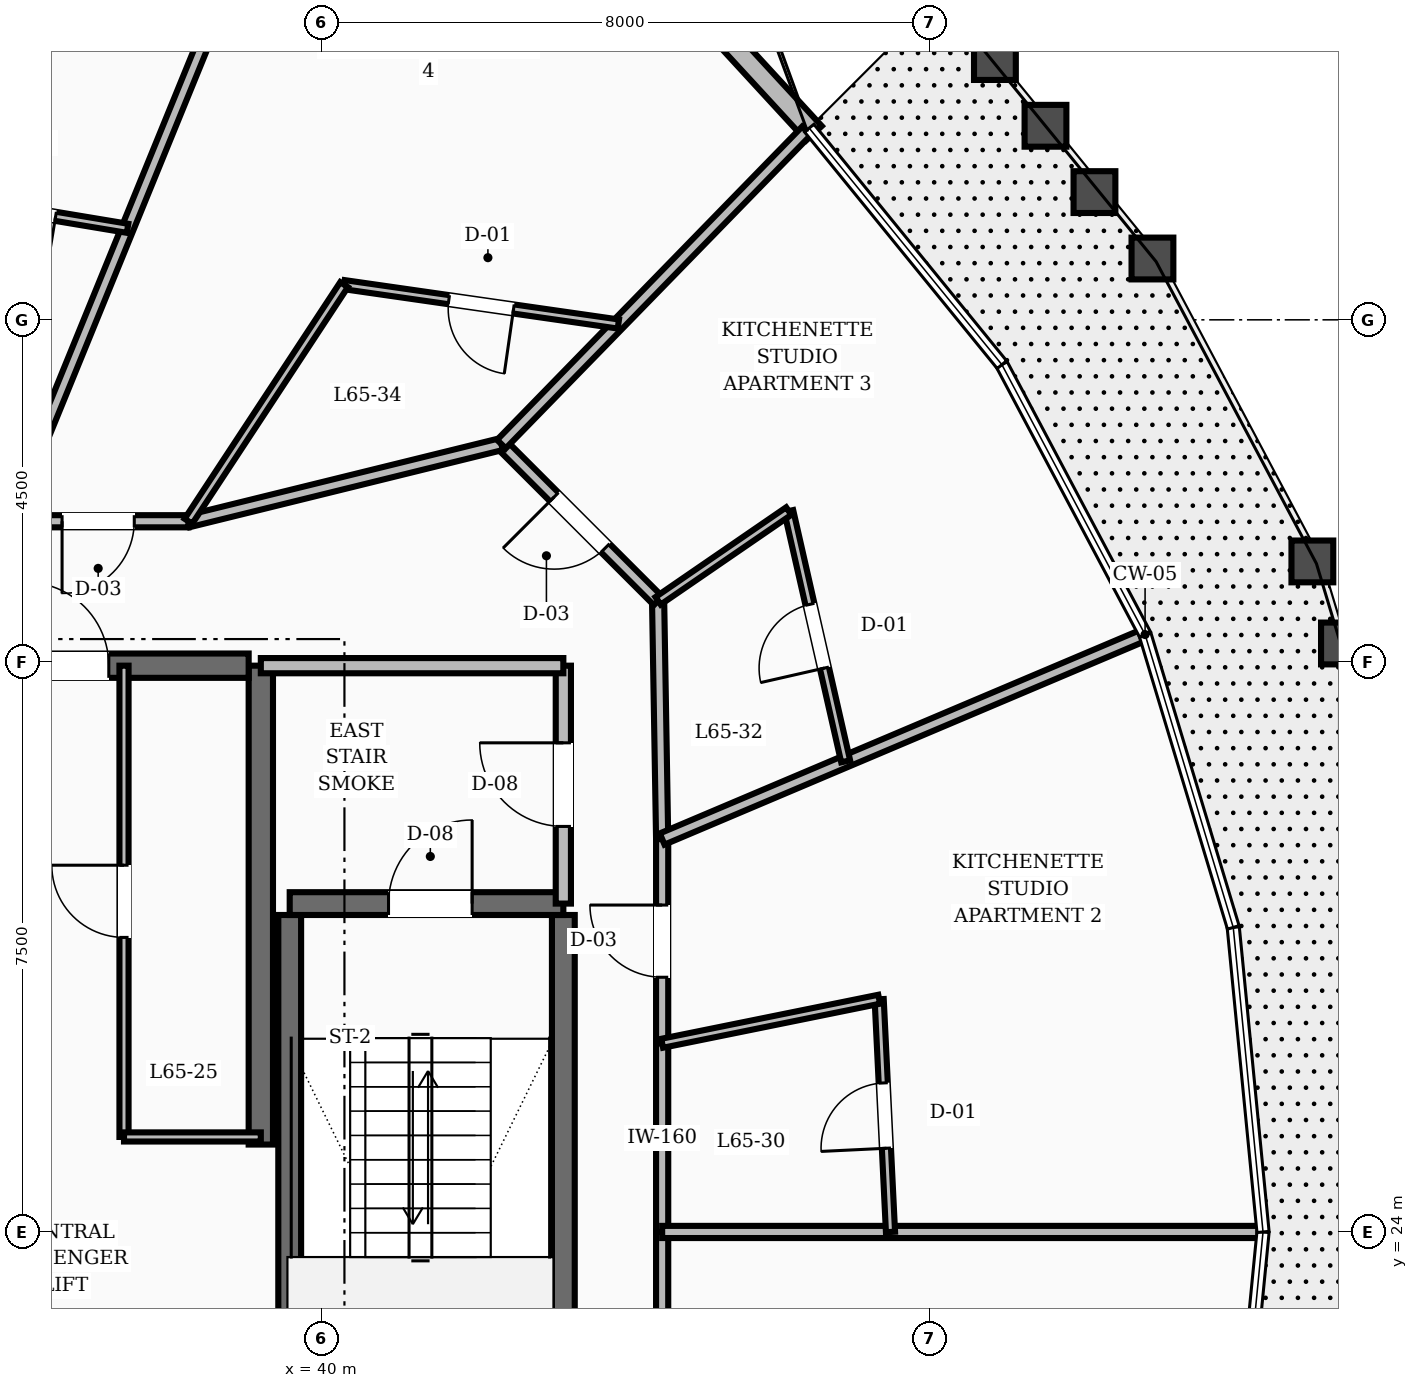
"""IFC4 building model, lengths in metres.
Left out: names, types, materials, properties, quantities, classifications, styles, units other than length and angle.
Written with IfcOpenShell. Run it as: python <this file> out.ifc"""

import sys

from ifc_helpers import new_model, si_unit, direction, frame, frame_2d, origin, place, context, subcontext, project, spatial, rectangle, extrude, element, fill, save


model = new_model("IFC4")
c1 = context("Model", 3, precision=1e-05, world=origin(), true_north=direction((0.0, 1.0)))
c2 = subcontext(c1, "Body", "Model", "MODEL_VIEW")
j1 = project(units=[si_unit("LENGTHUNIT", "METRE"), si_unit("PLANEANGLEUNIT", "RADIAN")], contexts=[c1])
p1 = place(None, origin())
s1 = spatial("IfcSite", under=j1, at=p1, CompositionType="ELEMENT")
p2 = place(p1, origin())
s2 = spatial("IfcBuilding", under=s1, at=p2, CompositionType="ELEMENT")
p3 = place(p2, frame((0.0, 0.0, 250.8)))
s3 = spatial("IfcBuildingStorey", under=s2, at=p3, CompositionType="ELEMENT", Elevation=250.8)
p4 = place(p3, frame((39.2, 25.15, 0.0), z_axis=(0.0, 0.0, 1.0), x_axis=(0.0, 1.0, 0.0)))
e1 = element("IfcWall", 1, at=p4, inside=s3, PredefinedType="SHEAR", context=c2, shape_type="SweptSolid", body=[
    extrude(rectangle(XDim=6.3, YDim=0.32, at=frame_2d((3.15, 0.0))), origin(), (0.0, 0.0, 1.0), 3.6),
])
p5 = place(p3, frame((35.8, 31.45, 0.0), z_axis=(0.0, 0.0, 1.0), x_axis=(1.0, 0.0, 0.0)))
e2 = element("IfcWall", 2, at=p5, inside=s3, PredefinedType="SHEAR", context=c2, shape_type="SweptSolid", body=[
    extrude(rectangle(XDim=3.24, YDim=0.32, at=frame_2d((1.62, 0.0))), origin(), (0.0, 0.0, 1.0), 3.6),
])
p6 = place(p5, frame((0.3, 0.0, 0.0)))
e3 = element("IfcOpeningElement", 3, at=p6, cuts=e2, PredefinedType="OPENING", context=c2, shape_type="SweptSolid", body=[
    extrude(rectangle(XDim=1.1, YDim=2.1, at=frame_2d((0.55, 1.05))), frame((0.0, 0.17, 0.0), z_axis=(0.0, -1.0, 0.0), x_axis=(1.0, 0.0, 0.0)), (0.0, 0.0, 1.0), 0.34),
])
for number, where, z_axis, x_axis in (
    (4, (43.18, 19.43, 0.0), (0.0, 0.0, 1.0), (0.0, 1.0, 0.0)),
    (5, (39.58, 19.43, 0.0), (0.0, 0.0, 1.0), (0.0, 1.0, 0.0)),
):
    element("IfcWall", number, at=place(p3, frame(where, z_axis=z_axis, x_axis=x_axis)), inside=s3, PredefinedType="SHEAR", context=c2, shape_type="SweptSolid", body=[
        extrude(rectangle(XDim=8.74, YDim=0.3, at=frame_2d((4.37, 0.0))), origin(), (0.0, 0.0, 1.0), 3.6),
    ])
p7 = place(p3, frame((39.58, 28.32, 0.0), z_axis=(0.0, 0.0, 1.0), x_axis=(1.0, 0.0, 0.0)))
e6 = element("IfcWall", 6, at=p7, inside=s3, PredefinedType="SHEAR", context=c2, shape_type="SweptSolid", body=[
    extrude(rectangle(XDim=3.6, YDim=0.3, at=frame_2d((1.8, 0.0))), origin(), (0.0, 0.0, 1.0), 3.6),
])
p8 = place(p7, frame((1.3, 0.0, 0.0)))
e7 = element("IfcOpeningElement", 7, at=p8, cuts=e6, PredefinedType="OPENING", context=c2, shape_type="SweptSolid", body=[
    extrude(rectangle(XDim=1.1, YDim=2.1, at=frame_2d((0.55, 1.05))), frame((0.0, 0.16, 0.0), z_axis=(0.0, -1.0, 0.0), x_axis=(1.0, 0.0, 0.0)), (0.0, 0.0, 1.0), 0.32),
])
p9 = place(p3, frame((46.477, 38.455, 0.0), z_axis=(0.0, 0.0, 1.0), x_axis=(-0.677046444882, 0.735940290698, 0.0)))
e8 = element("IfcWall", 8, at=p9, inside=s3, PredefinedType="STANDARD", context=c2, shape_type="SweptSolid", body=[
    extrude(rectangle(XDim=4.195, YDim=0.28, at=frame_2d((2.098, 0.0))), origin(), (0.0, 0.0, 1.0), 2.88),
])
p10 = place(p3, frame((43.18, 28.32, 0.0), z_axis=(0.0, 0.0, 1.0), x_axis=(0.0, 1.0, 0.0)))
e9 = element("IfcWall", 9, at=p10, inside=s3, PredefinedType="SOLIDWALL", context=c2, shape_type="SweptSolid", body=[
    extrude(rectangle(XDim=3.13, YDim=0.2, at=frame_2d((1.565, 0.0))), origin(), (0.0, 0.0, 1.0), 2.87),
])
p11 = place(p10, frame((1.015, 0.0, 0.0)))
e10 = element("IfcOpeningElement", 10, at=p11, cuts=e9, PredefinedType="OPENING", context=c2, shape_type="SweptSolid", body=[
    extrude(rectangle(XDim=1.1, YDim=2.1, at=frame_2d((0.55, 1.05))), frame((0.0, 0.11, 0.0), z_axis=(0.0, -1.0, 0.0), x_axis=(1.0, 0.0, 0.0)), (0.0, 0.0, 1.0), 0.22),
])
p12 = place(p3, frame((39.2, 31.45, 0.0), z_axis=(0.0, 0.0, 1.0), x_axis=(1.0, 0.0, 0.0)))
e11 = element("IfcWall", 11, at=p12, inside=s3, PredefinedType="SOLIDWALL", context=c2, shape_type="SweptSolid", body=[
    extrude(rectangle(XDim=3.98, YDim=0.2, at=frame_2d((1.99, 0.0))), origin(), (0.0, 0.0, 1.0), 2.87),
])
p13 = place(p3, frame((37.4, 25.25, 0.0), z_axis=(0.0, 0.0, 1.0), x_axis=(0.0, 1.0, 0.0)))
e12 = element("IfcWall", 12, at=p13, inside=s3, PredefinedType="PARTITIONING", context=c2, shape_type="SweptSolid", body=[
    extrude(rectangle(XDim=6.2, YDim=0.12, at=frame_2d((3.1, 0.0))), origin(), (0.0, 0.0, 1.0), 2.87),
])
p14 = place(p13, frame((2.625, 0.0, 0.0)))
e13 = element("IfcOpeningElement", 13, at=p14, cuts=e12, PredefinedType="OPENING", context=c2, shape_type="SweptSolid", body=[
    extrude(rectangle(XDim=0.95, YDim=2.1, at=frame_2d((0.475, 1.05))), frame((0.0, 0.07, 0.0), z_axis=(0.0, -1.0, 0.0), x_axis=(1.0, 0.0, 0.0)), (0.0, 0.0, 1.0), 0.14),
])
p15 = place(p3, frame((37.4, 25.25, 0.0), z_axis=(0.0, 0.0, 1.0), x_axis=(1.0, 0.0, 0.0)))
e14 = element("IfcWall", 14, at=p15, inside=s3, PredefinedType="PARTITIONING", context=c2, shape_type="SweptSolid", body=[
    extrude(rectangle(XDim=1.8, YDim=0.12, at=frame_2d((0.9, 0.0))), origin(), (0.0, 0.0, 1.0), 2.87),
])
p16 = place(p3, frame((44.48, 24.0, 0.0), z_axis=(0.0, 0.0, 1.0), x_axis=(0.0, 1.0, 0.0)))
e15 = element("IfcWall", 15, at=p16, inside=s3, PredefinedType="SOLIDWALL", context=c2, shape_type="SweptSolid", body=[
    extrude(rectangle(XDim=2.482, YDim=0.16, at=frame_2d((1.241, 0.0))), origin(), (0.0, 0.0, 1.0), 2.87),
])
p17 = place(p3, frame((44.48, 26.482, 0.0), z_axis=(0.0, 0.0, 1.0), x_axis=(0.0, 1.0, 0.0)))
e16 = element("IfcWall", 16, at=p17, inside=s3, PredefinedType="SOLIDWALL", context=c2, shape_type="SweptSolid", body=[
    extrude(rectangle(XDim=2.687, YDim=0.16, at=frame_2d((1.344, 0.0))), origin(), (0.0, 0.0, 1.0), 2.87),
])
p18 = place(p17, frame((0.868, 0.0, 0.0)))
e17 = element("IfcOpeningElement", 17, at=p18, cuts=e16, PredefinedType="OPENING", context=c2, shape_type="SweptSolid", body=[
    extrude(rectangle(XDim=0.95, YDim=2.1, at=frame_2d((0.475, 1.05))), frame((0.0, 0.09, 0.0), z_axis=(0.0, -1.0, 0.0), x_axis=(1.0, 0.0, 0.0)), (0.0, 0.0, 1.0), 0.18),
])
p19 = place(p3, frame((44.48, 29.169, 0.0), z_axis=(0.0, 0.0, 1.0), x_axis=(-0.016981035134, 0.999855811828, 0.0)))
e18 = element("IfcWall", 18, at=p19, inside=s3, PredefinedType="SOLIDWALL", context=c2, shape_type="SweptSolid", body=[
    extrude(rectangle(XDim=3.134, YDim=0.16, at=frame_2d((1.567, 0.0))), origin(), (0.0, 0.0, 1.0), 2.87),
])
p20 = place(p3, frame((44.427, 32.303, 0.0), z_axis=(0.0, 0.0, 1.0), x_axis=(-0.707106781187, 0.707106781187, 0.0)))
e19 = element("IfcWall", 19, at=p20, inside=s3, PredefinedType="SOLIDWALL", context=c2, shape_type="SweptSolid", body=[
    extrude(rectangle(XDim=2.916, YDim=0.16, at=frame_2d((1.458, 0.0))), origin(), (0.0, 0.0, 1.0), 2.87),
])
p21 = place(p20, frame((0.983, 0.0, 0.0)))
e20 = element("IfcOpeningElement", 20, at=p21, cuts=e19, PredefinedType="OPENING", context=c2, shape_type="SweptSolid", body=[
    extrude(rectangle(XDim=0.95, YDim=2.1, at=frame_2d((0.475, 1.05))), frame((0.0, 0.09, 0.0), z_axis=(0.0, -1.0, 0.0), x_axis=(1.0, 0.0, 0.0)), (0.0, 0.0, 1.0), 0.18),
])
p22 = place(p3, frame((42.365, 34.365, 0.0), z_axis=(0.0, 0.0, 1.0), x_axis=(-0.970939799552, -0.239323850978, 0.0)))
e21 = element("IfcWall", 21, at=p22, inside=s3, PredefinedType="SOLIDWALL", context=c2, shape_type="SweptSolid", body=[
    extrude(rectangle(XDim=4.241, YDim=0.16, at=frame_2d((2.12, 0.0))), origin(), (0.0, 0.0, 1.0), 2.87),
])
p23 = place(p3, frame((38.248, 33.35, 0.0), z_axis=(0.0, 0.0, 1.0), x_axis=(-1.0, 0.0, 0.0)))
e22 = element("IfcWall", 22, at=p23, inside=s3, PredefinedType="SOLIDWALL", context=c2, shape_type="SweptSolid", body=[
    extrude(rectangle(XDim=2.375, YDim=0.16, at=frame_2d((1.188, 0.0))), origin(), (0.0, 0.0, 1.0), 2.87),
])
p24 = place(p23, frame((0.712, 0.0, 0.0)))
e23 = element("IfcOpeningElement", 23, at=p24, cuts=e22, PredefinedType="OPENING", context=c2, shape_type="SweptSolid", body=[
    extrude(rectangle(XDim=0.95, YDim=2.1, at=frame_2d((0.475, 1.05))), frame((0.0, 0.09, 0.0), z_axis=(0.0, -1.0, 0.0), x_axis=(1.0, 0.0, 0.0)), (0.0, 0.0, 1.0), 0.18),
])
p25 = place(p3, frame((44.48, 21.518, 0.0), z_axis=(0.0, 0.0, 1.0), x_axis=(0.0, 1.0, 0.0)))
e24 = element("IfcWall", 24, at=p25, inside=s3, PredefinedType="SOLIDWALL", context=c2, shape_type="SweptSolid", body=[
    extrude(rectangle(XDim=2.482, YDim=0.16, at=frame_2d((1.241, 0.0))), origin(), (0.0, 0.0, 1.0), 2.87),
])
p26 = place(p3, frame((44.48, 24.0, 0.0), z_axis=(0.0, 0.0, 1.0), x_axis=(1.0, 0.0, 0.0)))
e25 = element("IfcWall", 25, at=p26, inside=s3, PredefinedType="SOLIDWALL", context=c2, shape_type="SweptSolid", body=[
    extrude(rectangle(XDim=7.855, YDim=0.16, at=frame_2d((3.928, 0.0))), origin(), (0.0, 0.0, 1.0), 2.87),
])
p27 = place(p3, frame((47.484, 24.0, 0.0), z_axis=(0.0, 0.0, 1.0), x_axis=(-0.048507424132, 0.998822822028, 0.0)))
e26 = element("IfcWall", 26, at=p27, inside=s3, PredefinedType="PARTITIONING", context=c2, shape_type="SweptSolid", body=[
    extrude(rectangle(XDim=3.065, YDim=0.12, at=frame_2d((1.533, 0.0))), origin(), (0.0, 0.0, 1.0), 2.87),
])
p28 = place(p27, frame((1.103, 0.0, 0.0)))
e27 = element("IfcOpeningElement", 27, at=p28, cuts=e26, PredefinedType="OPENING", context=c2, shape_type="SweptSolid", body=[
    extrude(rectangle(XDim=0.86, YDim=2.1, at=frame_2d((0.43, 1.05))), frame((0.0, 0.07, 0.0), z_axis=(0.0, -1.0, 0.0), x_axis=(1.0, 0.0, 0.0)), (0.0, 0.0, 1.0), 0.14),
])
p29 = place(p3, frame((44.48, 26.482, 0.0), z_axis=(0.0, 0.0, 1.0), x_axis=(0.980045260394, 0.198774464101, 0.0)))
e28 = element("IfcWall", 28, at=p29, inside=s3, PredefinedType="PARTITIONING", context=c2, shape_type="SweptSolid", body=[
    extrude(rectangle(XDim=2.913, YDim=0.12, at=frame_2d((1.457, 0.0))), origin(), (0.0, 0.0, 1.0), 2.87),
])
p30 = place(p3, frame((44.48, 29.169, 0.0), z_axis=(0.0, 0.0, 1.0), x_axis=(0.920872772273, 0.389863228949, 0.0)))
e29 = element("IfcWall", 29, at=p30, inside=s3, PredefinedType="SOLIDWALL", context=c2, shape_type="SweptSolid", body=[
    extrude(rectangle(XDim=6.85, YDim=0.16, at=frame_2d((3.425, 0.0))), origin(), (0.0, 0.0, 1.0), 2.87),
])
p31 = place(p3, frame((46.894, 30.192, 0.0), z_axis=(0.0, 0.0, 1.0), x_axis=(-0.221774244265, 0.975098038446, 0.0)))
e30 = element("IfcWall", 30, at=p31, inside=s3, PredefinedType="PARTITIONING", context=c2, shape_type="SweptSolid", body=[
    extrude(rectangle(XDim=3.376, YDim=0.12, at=frame_2d((1.688, 0.0))), origin(), (0.0, 0.0, 1.0), 2.87),
])
p32 = place(p31, frame((1.258, 0.0, 0.0)))
e31 = element("IfcOpeningElement", 31, at=p32, cuts=e30, PredefinedType="OPENING", context=c2, shape_type="SweptSolid", body=[
    extrude(rectangle(XDim=0.86, YDim=2.1, at=frame_2d((0.43, 1.05))), frame((0.0, 0.07, 0.0), z_axis=(0.0, -1.0, 0.0), x_axis=(1.0, 0.0, 0.0)), (0.0, 0.0, 1.0), 0.14),
])
p33 = place(p3, frame((44.427, 32.303, 0.0), z_axis=(0.0, 0.0, 1.0), x_axis=(0.824260499572, 0.566210763626, 0.0)))
e32 = element("IfcWall", 32, at=p33, inside=s3, PredefinedType="PARTITIONING", context=c2, shape_type="SweptSolid", body=[
    extrude(rectangle(XDim=2.085, YDim=0.12, at=frame_2d((1.042, 0.0))), origin(), (0.0, 0.0, 1.0), 2.87),
])
p34 = place(p3, frame((42.365, 34.365, 0.0), z_axis=(0.0, 0.0, 1.0), x_axis=(0.697753092732, 0.716338342952, 0.0)))
e33 = element("IfcWall", 33, at=p34, inside=s3, PredefinedType="SOLIDWALL", context=c2, shape_type="SweptSolid", body=[
    extrude(rectangle(XDim=5.754, YDim=0.16, at=frame_2d((2.877, 0.0))), origin(), (0.0, 0.0, 1.0), 2.87),
])
p35 = place(p3, frame((43.904, 35.945, 0.0), z_axis=(0.0, 0.0, 1.0), x_axis=(-0.989850131558, 0.142115154206, 0.0)))
e34 = element("IfcWall", 34, at=p35, inside=s3, PredefinedType="PARTITIONING", context=c2, shape_type="SweptSolid", body=[
    extrude(rectangle(XDim=3.646, YDim=0.12, at=frame_2d((1.823, 0.0))), origin(), (0.0, 0.0, 1.0), 2.87),
])
p36 = place(p35, frame((1.393, 0.0, 0.0)))
e35 = element("IfcOpeningElement", 35, at=p36, cuts=e34, PredefinedType="OPENING", context=c2, shape_type="SweptSolid", body=[
    extrude(rectangle(XDim=0.86, YDim=2.1, at=frame_2d((0.43, 1.05))), frame((0.0, 0.07, 0.0), z_axis=(0.0, -1.0, 0.0), x_axis=(1.0, 0.0, 0.0)), (0.0, 0.0, 1.0), 0.14),
])
p37 = place(p3, frame((38.248, 33.35, 0.0), z_axis=(0.0, 0.0, 1.0), x_axis=(0.549609280911, 0.835421832571, 0.0)))
e36 = element("IfcWall", 36, at=p37, inside=s3, PredefinedType="PARTITIONING", context=c2, shape_type="SweptSolid", body=[
    extrude(rectangle(XDim=3.726, YDim=0.12, at=frame_2d((1.863, 0.0))), origin(), (0.0, 0.0, 1.0), 2.87),
])
p38 = place(p3, frame((35.873, 33.35, 0.0), z_axis=(0.0, 0.0, 1.0), x_axis=(0.378155079747, 0.925742262005, 0.0)))
e37 = element("IfcWall", 37, at=p38, inside=s3, PredefinedType="SOLIDWALL", context=c2, shape_type="SweptSolid", body=[
    extrude(rectangle(XDim=10.905, YDim=0.16, at=frame_2d((5.453, 0.0))), origin(), (0.0, 0.0, 1.0), 2.87),
])
p39 = place(p3, frame((37.447, 37.204, 0.0), z_axis=(0.0, 0.0, 1.0), x_axis=(-0.986441372128, 0.164114043742, 0.0)))
e38 = element("IfcWall", 38, at=p39, inside=s3, PredefinedType="PARTITIONING", context=c2, shape_type="SweptSolid", body=[
    extrude(rectangle(XDim=2.779, YDim=0.12, at=frame_2d((1.389, 0.0))), origin(), (0.0, 0.0, 1.0), 2.87),
])
p40 = place(p39, frame((0.959, 0.0, 0.0)))
e39 = element("IfcOpeningElement", 39, at=p40, cuts=e38, PredefinedType="OPENING", context=c2, shape_type="SweptSolid", body=[
    extrude(rectangle(XDim=0.86, YDim=2.1, at=frame_2d((0.43, 1.05))), frame((0.0, 0.07, 0.0), z_axis=(0.0, -1.0, 0.0), x_axis=(1.0, 0.0, 0.0)), (0.0, 0.0, 1.0), 0.14),
])
p41 = place(p8, origin())
e40 = element("IfcDoor", 40, at=p41, inside=s3, OperationType="SINGLE_SWING_RIGHT", PredefinedType="DOOR", context=c2, shape_type="SweptSolid", body=[
    extrude(rectangle(XDim=1.1, YDim=2.1, at=frame_2d((0.55, 1.05))), frame((0.0, 0.025, 0.0), z_axis=(0.0, -1.0, 0.0), x_axis=(1.0, 0.0, 0.0)), (0.0, 0.0, 1.0), 0.05),
])
fill(e7, e40)
p42 = place(p11, origin())
e41 = element("IfcDoor", 41, at=p42, inside=s3, OperationType="SINGLE_SWING_RIGHT", PredefinedType="DOOR", context=c2, shape_type="SweptSolid", body=[
    extrude(rectangle(XDim=1.1, YDim=2.1, at=frame_2d((0.55, 1.05))), frame((0.0, 0.025, 0.0), z_axis=(0.0, -1.0, 0.0), x_axis=(1.0, 0.0, 0.0)), (0.0, 0.0, 1.0), 0.05),
])
fill(e10, e41)
p43 = place(p6, origin())
e42 = element("IfcDoor", 42, at=p43, inside=s3, OperationType="SINGLE_SWING_LEFT", PredefinedType="DOOR", context=c2, shape_type="SweptSolid", body=[
    extrude(rectangle(XDim=1.1, YDim=2.1, at=frame_2d((0.55, 1.05))), frame((0.0, 0.025, 0.0), z_axis=(0.0, -1.0, 0.0), x_axis=(1.0, 0.0, 0.0)), (0.0, 0.0, 1.0), 0.05),
])
fill(e3, e42)
p44 = place(p14, origin())
e43 = element("IfcDoor", 43, at=p44, inside=s3, OperationType="SINGLE_SWING_RIGHT", PredefinedType="DOOR", context=c2, shape_type="SweptSolid", body=[
    extrude(rectangle(XDim=0.95, YDim=2.1, at=frame_2d((0.475, 1.05))), frame((0.0, 0.025, 0.0), z_axis=(0.0, -1.0, 0.0), x_axis=(1.0, 0.0, 0.0)), (0.0, 0.0, 1.0), 0.05),
])
fill(e13, e43)
p45 = place(p28, origin())
e44 = element("IfcDoor", 44, at=p45, inside=s3, OperationType="SINGLE_SWING_LEFT", PredefinedType="DOOR", context=c2, shape_type="SweptSolid", body=[
    extrude(rectangle(XDim=0.86, YDim=2.1, at=frame_2d((0.43, 1.05))), frame((0.0, 0.025, 0.0), z_axis=(0.0, -1.0, 0.0), x_axis=(1.0, 0.0, 0.0)), (0.0, 0.0, 1.0), 0.05),
])
fill(e27, e44)
p46 = place(p18, origin())
e45 = element("IfcDoor", 45, at=p46, inside=s3, OperationType="SINGLE_SWING_RIGHT", PredefinedType="DOOR", context=c2, shape_type="SweptSolid", body=[
    extrude(rectangle(XDim=0.95, YDim=2.1, at=frame_2d((0.475, 1.05))), frame((0.0, 0.025, 0.0), z_axis=(0.0, -1.0, 0.0), x_axis=(1.0, 0.0, 0.0)), (0.0, 0.0, 1.0), 0.05),
])
fill(e17, e45)
p47 = place(p32, origin())
e46 = element("IfcDoor", 46, at=p47, inside=s3, OperationType="SINGLE_SWING_LEFT", PredefinedType="DOOR", context=c2, shape_type="SweptSolid", body=[
    extrude(rectangle(XDim=0.86, YDim=2.1, at=frame_2d((0.43, 1.05))), frame((0.0, 0.025, 0.0), z_axis=(0.0, -1.0, 0.0), x_axis=(1.0, 0.0, 0.0)), (0.0, 0.0, 1.0), 0.05),
])
fill(e31, e46)
p48 = place(p21, origin())
e47 = element("IfcDoor", 47, at=p48, inside=s3, OperationType="SINGLE_SWING_RIGHT", PredefinedType="DOOR", context=c2, shape_type="SweptSolid", body=[
    extrude(rectangle(XDim=0.95, YDim=2.1, at=frame_2d((0.475, 1.05))), frame((0.0, 0.025, 0.0), z_axis=(0.0, -1.0, 0.0), x_axis=(1.0, 0.0, 0.0)), (0.0, 0.0, 1.0), 0.05),
])
fill(e20, e47)
p49 = place(p36, origin())
e48 = element("IfcDoor", 48, at=p49, inside=s3, OperationType="SINGLE_SWING_LEFT", PredefinedType="DOOR", context=c2, shape_type="SweptSolid", body=[
    extrude(rectangle(XDim=0.86, YDim=2.1, at=frame_2d((0.43, 1.05))), frame((0.0, 0.025, 0.0), z_axis=(0.0, -1.0, 0.0), x_axis=(1.0, 0.0, 0.0)), (0.0, 0.0, 1.0), 0.05),
])
fill(e35, e48)
p50 = place(p24, origin())
e49 = element("IfcDoor", 49, at=p50, inside=s3, OperationType="SINGLE_SWING_RIGHT", PredefinedType="DOOR", context=c2, shape_type="SweptSolid", body=[
    extrude(rectangle(XDim=0.95, YDim=2.1, at=frame_2d((0.475, 1.05))), frame((0.0, 0.025, 0.0), z_axis=(0.0, -1.0, 0.0), x_axis=(1.0, 0.0, 0.0)), (0.0, 0.0, 1.0), 0.05),
])
fill(e23, e49)
p51 = place(p40, origin())
e50 = element("IfcDoor", 50, at=p51, inside=s3, OperationType="SINGLE_SWING_LEFT", PredefinedType="DOOR", context=c2, shape_type="SweptSolid", body=[
    extrude(rectangle(XDim=0.86, YDim=2.1, at=frame_2d((0.43, 1.05))), frame((0.0, 0.025, 0.0), z_axis=(0.0, -1.0, 0.0), x_axis=(1.0, 0.0, 0.0)), (0.0, 0.0, 1.0), 0.05),
])
fill(e39, e50)
save(model, sys.argv[1])
